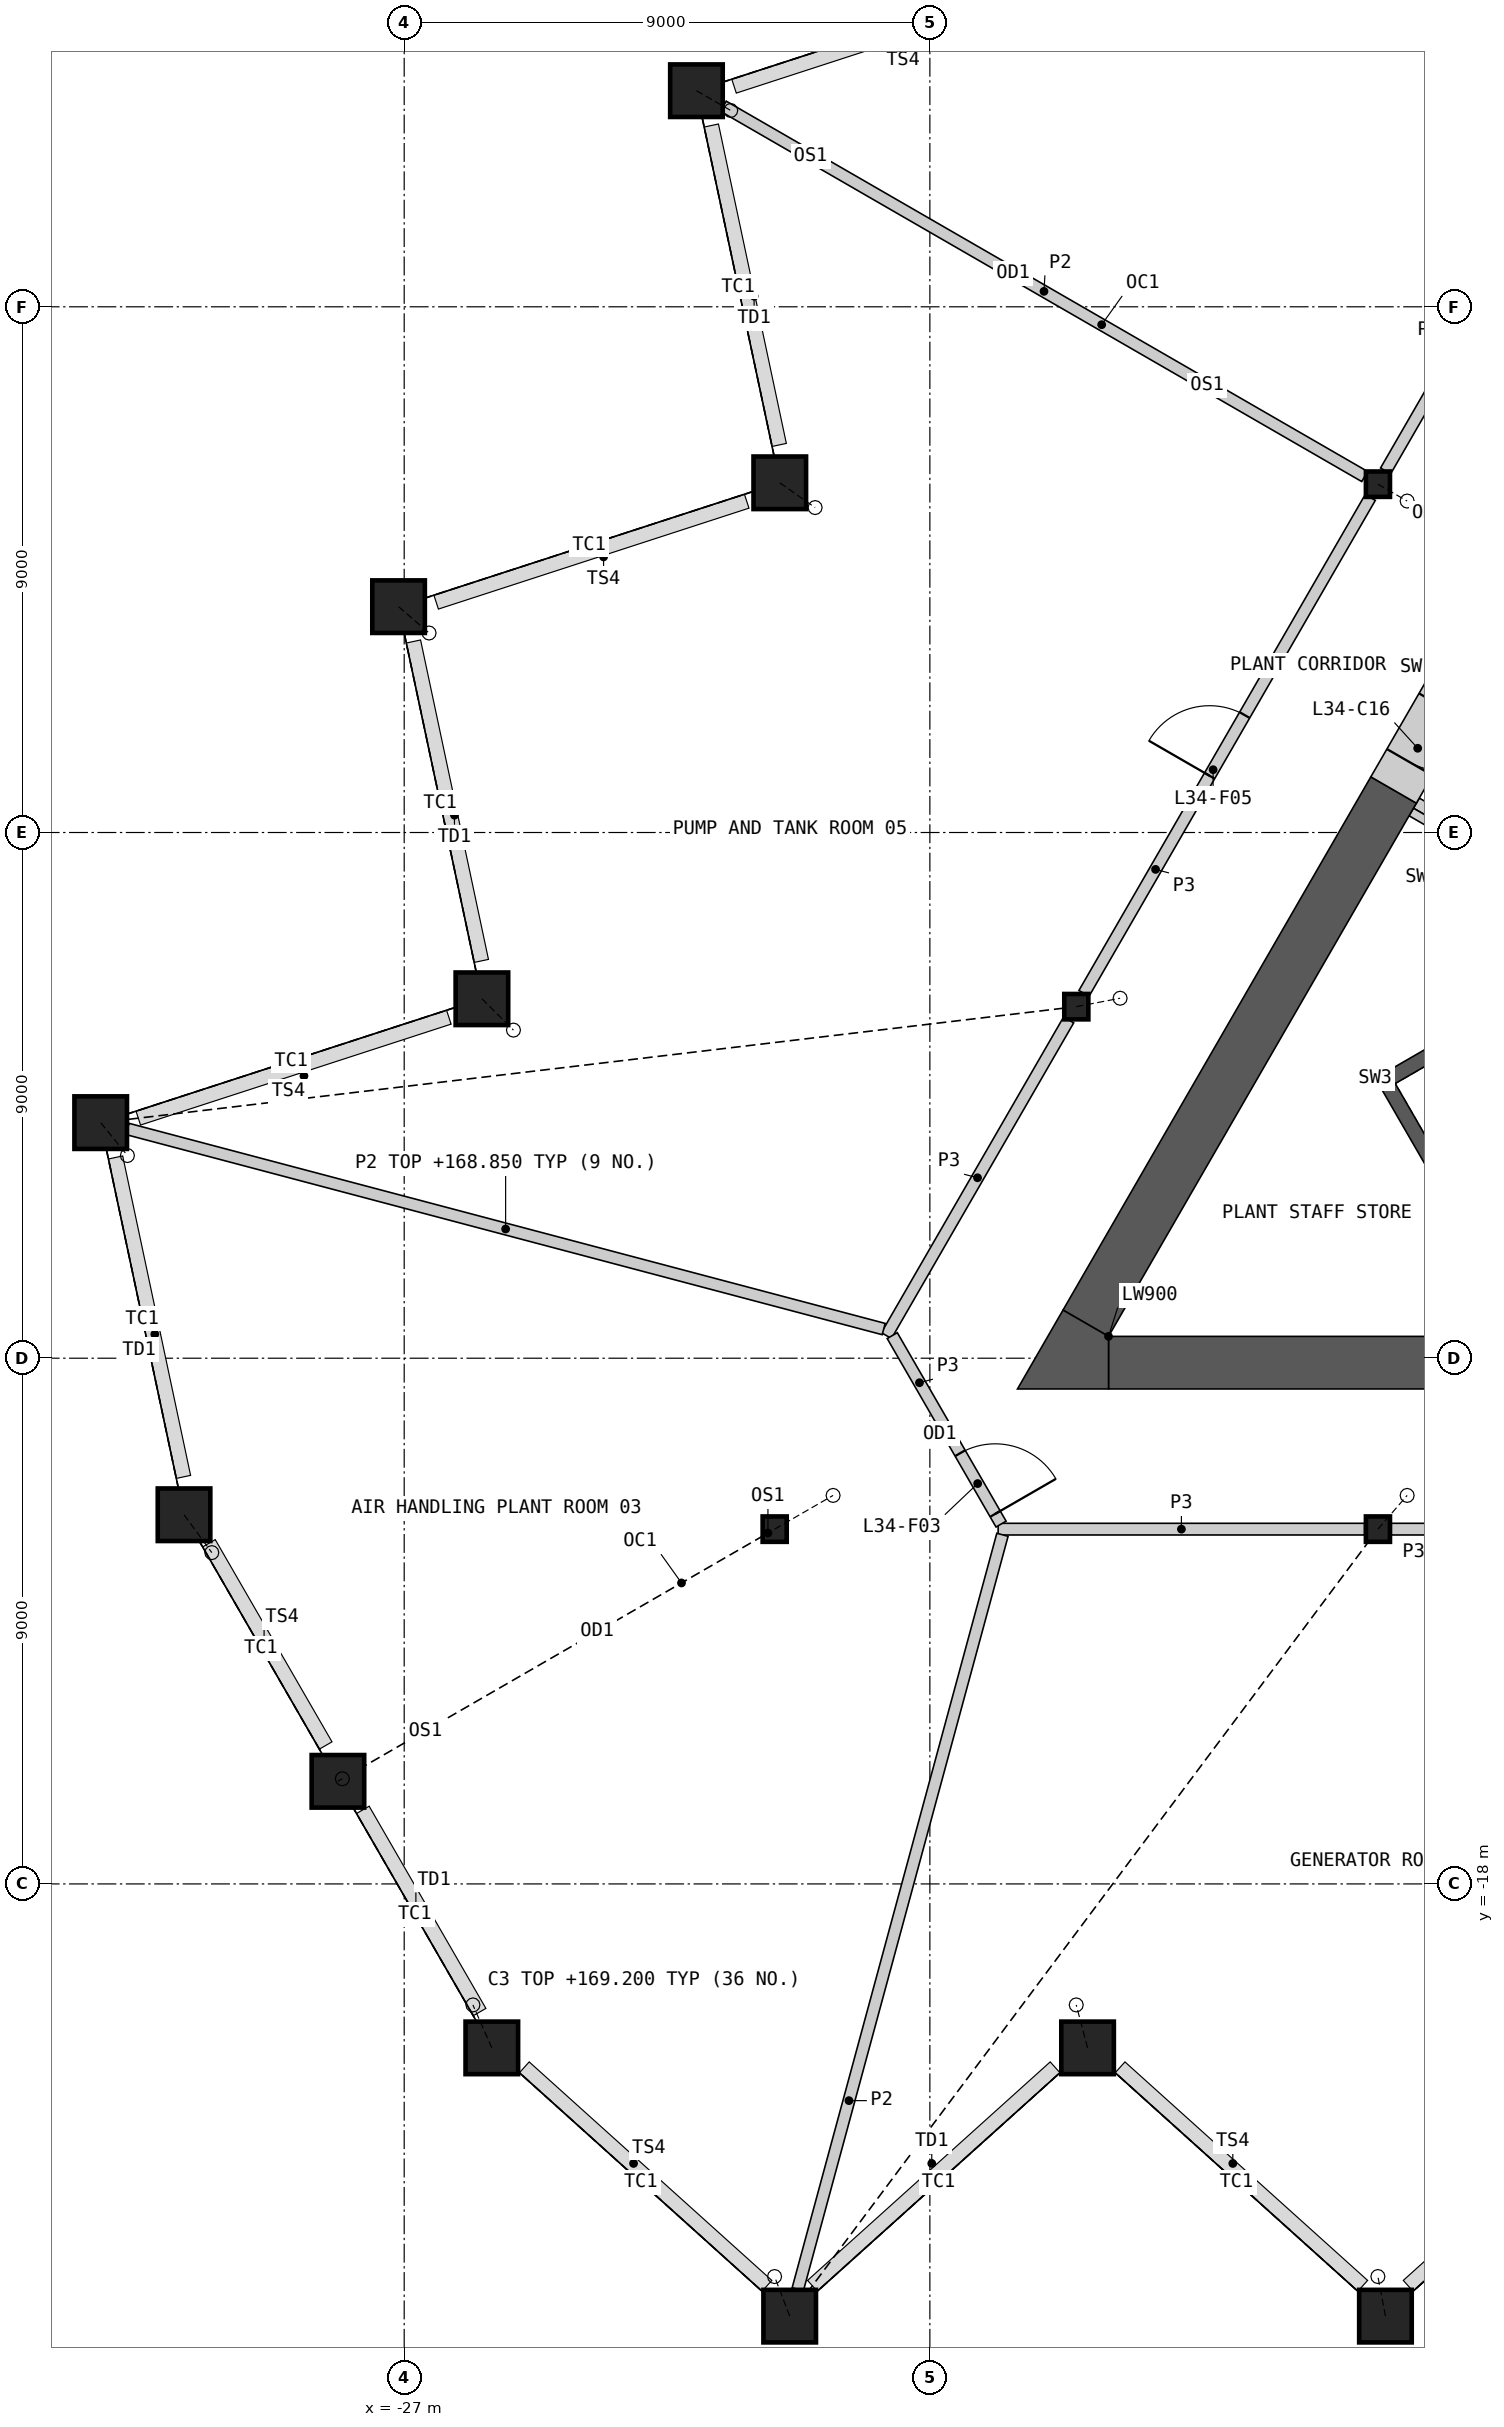
"""IFC4 building model, lengths in metres.
Left out: names, types, materials, properties, quantities, classifications, styles, units other than length and angle.
Written with IfcOpenShell. Run it as: python <this file> out.ifc"""

import sys

from ifc_helpers import new_model, si_unit, direction, frame, frame_2d, origin, origin_2d, place, context, subcontext, project, spatial, polyline, rectangle, hollow_rectangle, i_section, outline, extrude, element, fill, save


model = new_model("IFC4")
c1 = context("Model", 3, precision=1e-05, world=origin(), true_north=direction((0.0, 1.0)))
c2 = subcontext(c1, "Body", "Model", "MODEL_VIEW")
j1 = project(units=[si_unit("LENGTHUNIT", "METRE"), si_unit("PLANEANGLEUNIT", "RADIAN")], contexts=[c1])
p1 = place(None, origin())
s1 = spatial("IfcSite", under=j1, at=p1, CompositionType="ELEMENT")
p2 = place(p1, origin())
s2 = spatial("IfcBuilding", under=s1, at=p2, CompositionType="ELEMENT")
p3 = place(p2, frame((0.0, 0.0, 164.2)))
s3 = spatial("IfcBuildingStorey", under=s2, at=p3, CompositionType="ELEMENT", Elevation=164.2)
p4 = place(p3, frame((-25.5, -20.807, 0.0), z_axis=(-0.063925118443, 0.145301890638, 0.987320079715), x_axis=(-0.915332943749, -0.402697904251, 0.0)))
e1 = element("IfcColumn", 1, at=p4, inside=s3, PredefinedType="COLUMN", context=c2, shape_type="SweptSolid", body=[
    extrude(hollow_rectangle(XDim=0.9, YDim=0.9, WallThickness=0.06, at=origin_2d()), frame((0.0, 0.0, 0.072)), (0.0, 0.0, 1.0), 4.919),
])
p5 = place(p3, frame((-20.4, -25.399, 0.0), z_axis=(-0.051318190418, 0.13409414163, 0.989638926333), x_axis=(-0.93394282344, -0.3574224427, 0.0)))
e2 = element("IfcColumn", 2, at=p5, inside=s3, PredefinedType="COLUMN", context=c2, shape_type="SweptSolid", body=[
    extrude(hollow_rectangle(XDim=0.9, YDim=0.9, WallThickness=0.06, at=origin_2d()), frame((0.0, 0.0, 0.065)), (0.0, 0.0, 1.0), 4.922),
])
p6 = place(p3, frame((-15.3, -20.807, 0.0), z_axis=(-0.038424605206, 0.145492160916, 0.988612958051), x_axis=(-0.966849777203, -0.255345860204, 0.0)))
e3 = element("IfcColumn", 3, at=p6, inside=s3, PredefinedType="COLUMN", context=c2, shape_type="SweptSolid", body=[
    extrude(hollow_rectangle(XDim=0.9, YDim=0.9, WallThickness=0.06, at=origin_2d()), frame((0.0, 0.0, 0.069)), (0.0, 0.0, 1.0), 4.921),
])
p7 = place(p3, frame((-10.2, -25.399, 0.0), z_axis=(-0.025636135128, 0.134226933927, 0.990618957412), x_axis=(-0.982245501071, -0.187600041646, 0.0)))
e4 = element("IfcColumn", 4, at=p7, inside=s3, PredefinedType="COLUMN", context=c2, shape_type="SweptSolid", body=[
    extrude(hollow_rectangle(XDim=0.9, YDim=0.9, WallThickness=0.06, at=origin_2d()), frame((0.0, 0.0, 0.062)), (0.0, 0.0, 1.0), 4.923),
])
p8 = place(p3, frame((-21.996, 12.699, 0.0), z_axis=(0.116319547646, -0.067111153322, 0.990941903411), x_axis=(0.499743247872, 0.866173588957, 0.0)))
e5 = element("IfcColumn", 5, at=p8, inside=s3, PredefinedType="COLUMN", context=c2, shape_type="SweptSolid", body=[
    extrude(hollow_rectangle(XDim=0.9, YDim=0.9, WallThickness=0.06, at=origin_2d()), frame((0.0, 0.0, 0.061)), (0.0, 0.0, 1.0), 4.924),
])
p9 = place(p3, frame((-20.57, 5.987, 0.0), z_axis=(0.119696450413, -0.083903444055, 0.98925879922), x_axis=(0.573994494418, 0.81885915784, 0.0)))
e6 = element("IfcColumn", 6, at=p9, inside=s3, PredefinedType="COLUMN", context=c2, shape_type="SweptSolid", body=[
    extrude(hollow_rectangle(XDim=0.9, YDim=0.9, WallThickness=0.06, at=origin_2d()), frame((0.0, 0.0, 0.066)), (0.0, 0.0, 1.0), 4.921),
])
p10 = place(p3, frame((-27.096, 3.866, 0.0), z_axis=(0.103415089439, -0.089339415432, 0.990617881994), x_axis=(0.653730443992, 0.756727498243, 0.0)))
e7 = element("IfcColumn", 7, at=p10, inside=s3, PredefinedType="COLUMN", context=c2, shape_type="SweptSolid", body=[
    extrude(hollow_rectangle(XDim=0.9, YDim=0.9, WallThickness=0.06, at=origin_2d()), frame((0.0, 0.0, 0.062)), (0.0, 0.0, 1.0), 4.923),
])
p11 = place(p3, frame((-25.669, -2.846, 0.0), z_axis=(0.106777681535, -0.106053601417, 0.988610722354), x_axis=(0.70469703233, 0.709508345705, 0.0)))
e8 = element("IfcColumn", 8, at=p11, inside=s3, PredefinedType="COLUMN", context=c2, shape_type="SweptSolid", body=[
    extrude(hollow_rectangle(XDim=0.9, YDim=0.9, WallThickness=0.06, at=origin_2d()), frame((0.0, 0.0, 0.069)), (0.0, 0.0, 1.0), 4.921),
])
p12 = place(p3, frame((-32.196, -4.967, 0.0), z_axis=(0.090507303602, -0.111479097389, 0.989636720641), x_axis=(0.776350696847, 0.630301194276, 0.0)))
e9 = element("IfcColumn", 9, at=p12, inside=s3, PredefinedType="COLUMN", context=c2, shape_type="SweptSolid", body=[
    extrude(hollow_rectangle(XDim=0.9, YDim=0.9, WallThickness=0.06, at=origin_2d()), frame((0.0, 0.0, 0.065)), (0.0, 0.0, 1.0), 4.922),
])
p13 = place(p3, frame((-30.769, -11.68, 0.0), z_axis=(0.093862608604, -0.128042675117, 0.987317012947), x_axis=(0.806511174803, 0.59121884689, 0.0)))
e10 = element("IfcColumn", 10, at=p13, inside=s3, PredefinedType="COLUMN", context=c2, shape_type="SweptSolid", body=[
    extrude(hollow_rectangle(XDim=0.9, YDim=0.9, WallThickness=0.06, at=origin_2d()), frame((0.0, 0.0, 0.072)), (0.0, 0.0, 1.0), 4.919),
])
p14 = place(p3, frame((-28.135, -16.243, 0.0), z_axis=(0.015134407055, 0.008738899558, 0.999847279017), x_axis=(-0.500044870432, 0.865999496279, 0.0)))
e11 = element("IfcColumn", 11, at=p14, inside=s3, PredefinedType="COLUMN", context=c2, shape_type="SweptSolid", body=[
    extrude(hollow_rectangle(XDim=0.9, YDim=0.9, WallThickness=0.06, at=origin_2d()), frame((0.0, 0.0, 0.008)), (0.0, 0.0, 1.0), 4.985),
])
p15 = place(p3, frame((-10.328, 5.963, 0.0), z_axis=(0.099340040995, -0.057333949442, 0.993400409954), x_axis=(0.499868889286, 0.866101087359, 0.0)))
e12 = element("IfcColumn", 12, at=p15, inside=s3, PredefinedType="COLUMN", context=c2, shape_type="SweptSolid", body=[
    extrude(i_section(OverallWidth=0.412, OverallDepth=0.435, WebThickness=0.036, FlangeThickness=0.057, at=origin_2d()), frame((0.0, 0.0, 0.025)), (0.0, 0.0, 1.0), 4.983),
])
p16 = place(p3, frame((-15.493, -2.982, 0.0), z_axis=(0.148279879283, 0.028574768404, 0.988532528555), x_axis=(-0.189226752312, 0.981933417401, 0.0)))
e13 = element("IfcColumn", 13, at=p16, inside=s3, PredefinedType="COLUMN", context=c2, shape_type="SweptSolid", body=[
    extrude(i_section(OverallWidth=0.412, OverallDepth=0.435, WebThickness=0.036, FlangeThickness=0.057, at=origin_2d()), frame((0.0, 0.0, 0.033)), (0.0, 0.0, 1.0), 4.992),
])
p17 = place(p3, frame((-20.657, -11.926, 0.0), z_axis=(0.194870759968, 0.112516930499, 0.974353799839), x_axis=(-0.500027479704, 0.866009537788, 0.0)))
e14 = element("IfcColumn", 14, at=p17, inside=s3, PredefinedType="COLUMN", context=c2, shape_type="SweptSolid", body=[
    extrude(i_section(OverallWidth=0.412, OverallDepth=0.435, WebThickness=0.036, FlangeThickness=0.057, at=origin_2d()), frame((0.0, 0.0, 0.05)), (0.0, 0.0, 1.0), 5.031),
])
p18 = place(p3, frame((-10.328, -11.926, 0.0), z_axis=(0.098853266559, 0.114154284869, 0.988532665589), x_axis=(-0.755952685413, 0.654626257812, 0.0)))
e15 = element("IfcColumn", 15, at=p18, inside=s3, PredefinedType="COLUMN", context=c2, shape_type="SweptSolid", body=[
    extrude(i_section(OverallWidth=0.412, OverallDepth=0.435, WebThickness=0.036, FlangeThickness=0.057, at=origin_2d()), frame((0.0, 0.0, 0.033)), (0.0, 0.0, 1.0), 4.992),
])
p19 = place(p3, frame((-8.181, -0.357, 0.0), z_axis=(0.0, 0.0, 1.0), x_axis=(-0.866024871741, 0.500000921525, 0.0)))
e16 = element("IfcWall", 16, at=p19, inside=s3, PredefinedType="SHEAR", context=c2, shape_type="SweptSolid", body=[
    extrude(rectangle(XDim=1.72, YDim=0.2, at=frame_2d((0.86, 0.0))), origin(), (0.0, 0.0, 1.0), 4.65),
])
p20 = place(p3, origin())
e17 = element("IfcWall", 17, at=p20, inside=s3, PredefinedType="SHEAR", context=c2, shape_type="SweptSolid", body=[
    extrude(outline(polyline([(-5.307, -1.281), (-10.374, -4.206), (-10.032, -4.298), (-5.182, -1.498), (-5.307, -1.281)])), origin(), (0.0, 0.0, 1.0), 4.65),
])
p21 = place(p3, origin())
e18 = element("IfcWall", 18, at=p21, inside=s3, PredefinedType="SHEAR", context=c2, shape_type="SweptSolid", body=[
    extrude(outline(polyline([(-10.374, -4.206), (-8.83, -6.881), (-8.738, -6.539), (-10.032, -4.298), (-10.374, -4.206)])), origin(), (0.0, 0.0, 1.0), 4.65),
])
p22 = place(p3, frame((-8.268, -0.509, 0.0), z_axis=(0.0, 0.0, 1.0), x_axis=(-0.866024871741, 0.500000921525, 0.0)))
e19 = element("IfcWall", 19, at=p22, inside=s3, PredefinedType="PARTITIONING", context=c2, shape_type="SweptSolid", body=[
    extrude(rectangle(XDim=1.72, YDim=0.15, at=frame_2d((0.86, 0.0))), origin(), (0.0, 0.0, 1.0), 4.65),
])
p23 = place(p3, frame((-14.941, -9.076, 0.0), z_axis=(0.0, 0.0, 1.0), x_axis=(1.0, 0.0, 0.0)))
e20 = element("IfcWall", 20, at=p23, inside=s3, PredefinedType="SHEAR", context=c2, shape_type="SweptSolid", body=[
    extrude(rectangle(XDim=8.621, YDim=0.9, at=frame_2d((4.31, 0.0))), origin(), (0.0, 0.0, 1.0), 4.65),
])
p24 = place(p3, frame((-10.06, 0.728, 0.0), z_axis=(0.0, 0.0, 1.0), x_axis=(-0.499995114243, -0.866028224559, 0.0)))
e21 = element("IfcWall", 21, at=p24, inside=s3, PredefinedType="SHEAR", context=c2, shape_type="SweptSolid", body=[
    extrude(rectangle(XDim=10.541, YDim=0.9, at=frame_2d((5.271, 0.0))), origin(), (0.0, 0.0, 1.0), 4.65),
])
p25 = place(p3, origin())
e22 = element("IfcWall", 22, at=p25, inside=s3, PredefinedType="SHEAR", context=c2, shape_type="SweptSolid", body=[
    extrude(outline(polyline([(-14.941, -8.626), (-14.941, -9.526), (-16.5, -9.526), (-15.721, -8.176), (-14.941, -8.626)])), origin(), (0.0, 0.0, 1.0), 4.65),
])
p26 = place(p3, frame((-8.96, 2.633, 0.0), z_axis=(0.0, 0.0, 1.0), x_axis=(-0.50002983664, -0.866008176907, 0.0)))
e23 = element("IfcWall", 23, at=p26, inside=s3, PredefinedType="SHEAR", context=c2, shape_type="SweptSolid", body=[
    extrude(rectangle(XDim=2.2, YDim=0.9, at=frame_2d((1.1, 0.0))), origin(), (0.0, 0.0, 1.0), 4.65),
])
p27 = place(p26, frame((0.55, 0.0, 0.0)))
e24 = element("IfcOpeningElement", 24, at=p27, cuts=e23, PredefinedType="OPENING", context=c2, shape_type="SweptSolid", body=[
    extrude(rectangle(XDim=1.1, YDim=2.1, at=frame_2d((0.55, 1.05))), frame((0.0, 0.46, 0.0), z_axis=(0.0, -1.0, 0.0), x_axis=(1.0, 0.0, 0.0)), (0.0, 0.0, 1.0), 0.92),
])
p28 = place(p3, frame((-10.101, -11.926, 0.0), z_axis=(0.0, 0.0, 1.0), x_axis=(1.0, 0.0, 0.0)))
e25 = element("IfcWall", 25, at=p28, inside=s3, PredefinedType="PARTITIONING", context=c2, shape_type="SweptSolid", body=[
    extrude(rectangle(XDim=9.874, YDim=0.2, at=frame_2d((4.937, 0.0))), origin(), (0.0, 0.0, 1.0), 4.65),
])
p29 = place(p28, frame((4.337, 0.0, 0.0)))
e26 = element("IfcOpeningElement", 26, at=p29, cuts=e25, PredefinedType="OPENING", context=c2, shape_type="SweptSolid", body=[
    extrude(rectangle(XDim=1.2, YDim=2.1, at=frame_2d((0.6, 1.05))), frame((0.0, 0.11, 0.0), z_axis=(0.0, -1.0, 0.0), x_axis=(1.0, 0.0, 0.0)), (0.0, 0.0, 1.0), 0.22),
])
p30 = place(p3, frame((-15.361, -2.754, 0.0), z_axis=(0.0, 0.0, 1.0), x_axis=(0.500004141693, 0.866023012564, 0.0)))
e27 = element("IfcWall", 27, at=p30, inside=s3, PredefinedType="PARTITIONING", context=c2, shape_type="SweptSolid", body=[
    extrude(rectangle(XDim=9.803, YDim=0.2, at=frame_2d((4.902, 0.0))), origin(), (0.0, 0.0, 1.0), 4.65),
])
p31 = place(p30, frame((4.302, 0.0, 0.0)))
e28 = element("IfcOpeningElement", 28, at=p31, cuts=e27, PredefinedType="OPENING", context=c2, shape_type="SweptSolid", body=[
    extrude(rectangle(XDim=1.2, YDim=2.1, at=frame_2d((0.6, 1.05))), frame((0.0, 0.11, 0.0), z_axis=(0.0, -1.0, 0.0), x_axis=(1.0, 0.0, 0.0)), (0.0, 0.0, 1.0), 0.22),
])
p32 = place(p3, frame((-10.197, 6.19, 0.0), z_axis=(0.0, 0.0, 1.0), x_axis=(0.500012035596, 0.866018454918, 0.0)))
e29 = element("IfcWall", 29, at=p32, inside=s3, PredefinedType="PARTITIONING", context=c2, shape_type="SweptSolid", body=[
    extrude(rectangle(XDim=9.803, YDim=0.2, at=frame_2d((4.902, 0.0))), origin(), (0.0, 0.0, 1.0), 4.65),
])
p33 = place(p32, frame((4.302, 0.0, 0.0)))
e30 = element("IfcOpeningElement", 30, at=p33, cuts=e29, PredefinedType="OPENING", context=c2, shape_type="SweptSolid", body=[
    extrude(rectangle(XDim=1.2, YDim=2.1, at=frame_2d((0.6, 1.05))), frame((0.0, 0.11, 0.0), z_axis=(0.0, -1.0, 0.0), x_axis=(1.0, 0.0, 0.0)), (0.0, 0.0, 1.0), 0.22),
])
p34 = place(p3, frame((-16.831, -11.926, 0.0), z_axis=(0.0, 0.0, 1.0), x_axis=(1.0, 0.0, 0.0)))
e31 = element("IfcWall", 31, at=p34, inside=s3, PredefinedType="PARTITIONING", context=c2, shape_type="SweptSolid", body=[
    extrude(rectangle(XDim=6.275, YDim=0.2, at=frame_2d((3.137, 0.0))), origin(), (0.0, 0.0, 1.0), 4.65),
])
p35 = place(p3, frame((-18.744, -8.613, 0.0), z_axis=(0.0, 0.0, 1.0), x_axis=(0.499997920671, 0.866026604282, 0.0)))
e32 = element("IfcWall", 32, at=p35, inside=s3, PredefinedType="PARTITIONING", context=c2, shape_type="SweptSolid", body=[
    extrude(rectangle(XDim=6.24, YDim=0.2, at=frame_2d((3.12, 0.0))), origin(), (0.0, 0.0, 1.0), 4.65),
])
p36 = place(p3, frame((-18.644, -8.613, 0.0), z_axis=(0.0, 0.0, 1.0), x_axis=(0.499958791762, -0.866049194065, 0.0)))
e33 = element("IfcWall", 33, at=p36, inside=s3, PredefinedType="PARTITIONING", context=c2, shape_type="SweptSolid", body=[
    extrude(rectangle(XDim=3.726, YDim=0.2, at=frame_2d((1.863, 0.0))), origin(), (0.0, 0.0, 1.0), 4.65),
])
p37 = place(p36, frame((2.325, 0.0, 0.0)))
e34 = element("IfcOpeningElement", 34, at=p37, cuts=e33, PredefinedType="OPENING", context=c2, shape_type="SweptSolid", body=[
    extrude(rectangle(XDim=1.2, YDim=2.1, at=frame_2d((0.6, 1.05))), frame((0.0, 0.11, 0.0), z_axis=(0.0, -1.0, 0.0), x_axis=(1.0, 0.0, 0.0)), (0.0, 0.0, 1.0), 0.22),
])
p38 = place(p3, frame((-31.736, -5.075, 0.0), z_axis=(0.0, 0.0, 1.0), x_axis=(0.966727906646, -0.255806869555, 0.0)))
e35 = element("IfcWall", 35, at=p38, inside=s3, PredefinedType="PARTITIONING", context=c2, shape_type="SweptSolid", body=[
    extrude(rectangle(XDim=13.391, YDim=0.2, at=frame_2d((6.696, 0.0))), origin(), (0.0, 0.0, 1.0), 4.65),
])
p39 = place(p3, frame((-20.261, -24.939, 0.0), z_axis=(0.0, 0.0, 1.0), x_axis=(0.261845290604, 0.965109860994, 0.0)))
e36 = element("IfcWall", 36, at=p39, inside=s3, PredefinedType="PARTITIONING", context=c2, shape_type="SweptSolid", body=[
    extrude(rectangle(XDim=13.384, YDim=0.2, at=frame_2d((6.692, 0.0))), origin(), (0.0, 0.0, 1.0), 4.65),
])
p40 = place(p3, frame((-21.536, 12.434, 0.0), z_axis=(0.0, 0.0, 1.0), x_axis=(0.86602461759, -0.500001361726, 0.0)))
e37 = element("IfcWall", 37, at=p40, inside=s3, PredefinedType="PARTITIONING", context=c2, shape_type="SweptSolid", body=[
    extrude(rectangle(XDim=12.679, YDim=0.2, at=frame_2d((6.34, 0.0))), origin(), (0.0, 0.0, 1.0), 4.65),
])
p41 = place(p27, origin())
e38 = element("IfcDoor", 38, at=p41, inside=s3, OperationType="SINGLE_SWING_LEFT", PredefinedType="DOOR", context=c2, shape_type="SweptSolid", body=[
    extrude(rectangle(XDim=1.1, YDim=2.1, at=frame_2d((0.55, 1.05))), frame((0.0, 0.205, 0.0), z_axis=(0.0, -1.0, 0.0), x_axis=(1.0, 0.0, 0.0)), (0.0, 0.0, 1.0), 0.05),
])
fill(e24, e38)
p42 = place(p37, origin())
e39 = element("IfcDoor", 39, at=p42, inside=s3, OperationType="SINGLE_SWING_RIGHT", PredefinedType="DOOR", context=c2, shape_type="SweptSolid", body=[
    extrude(rectangle(XDim=1.2, YDim=2.1, at=frame_2d((0.6, 1.05))), frame((0.0, 0.025, 0.0), z_axis=(0.0, -1.0, 0.0), x_axis=(1.0, 0.0, 0.0)), (0.0, 0.0, 1.0), 0.05),
])
fill(e34, e39)
p43 = place(p31, origin())
e40 = element("IfcDoor", 40, at=p43, inside=s3, OperationType="SINGLE_SWING_LEFT", PredefinedType="DOOR", context=c2, shape_type="SweptSolid", body=[
    extrude(rectangle(XDim=1.2, YDim=2.1, at=frame_2d((0.6, 1.05))), frame((0.0, 0.025, 0.0), z_axis=(0.0, -1.0, 0.0), x_axis=(1.0, 0.0, 0.0)), (0.0, 0.0, 1.0), 0.05),
])
fill(e28, e40)
save(model, sys.argv[1])
